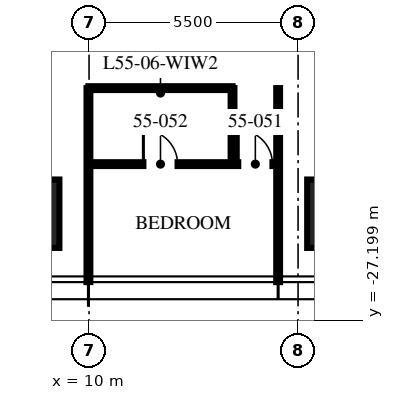
"""IFC4 building model, lengths in metres.
Left out: names, types, materials, properties, quantities, classifications, styles, units other than length and angle.
Written with IfcOpenShell. Run it as: python <this file> out.ifc"""

import sys

from ifc_helpers import new_model, si_unit, direction, frame, frame_2d, origin, origin_2d, place, context, subcontext, project, spatial, rectangle, extrude, element, fill, save


model = new_model("IFC4")
c1 = context("Model", 3, precision=1e-05, world=origin(), true_north=direction((0.0, 1.0)))
c2 = subcontext(c1, "Body", "Model", "MODEL_VIEW")
j1 = project(units=[si_unit("LENGTHUNIT", "METRE"), si_unit("PLANEANGLEUNIT", "RADIAN")], contexts=[c1])
p1 = place(None, origin())
s1 = spatial("IfcSite", under=j1, at=p1, CompositionType="ELEMENT")
p2 = place(p1, origin())
s2 = spatial("IfcBuilding", under=s1, at=p2, CompositionType="ELEMENT")
p3 = place(p2, frame((0.0, 0.0, 222.0)))
s3 = spatial("IfcBuildingStorey", under=s2, at=p3, CompositionType="ELEMENT", Elevation=222.0)
for number, where, z_axis, x_axis in (
    (1, (16.64, -24.4, 0.0), (0.0, 0.0, 1.0), (1.0, 0.0, 0.0)),
    (2, (8.32, -24.4, 0.0), (0.0, 0.0, 1.0), (1.0, 0.0, 0.0)),
):
    element("IfcColumn", number, at=place(p3, frame(where, z_axis=z_axis, x_axis=x_axis)), inside=s3, PredefinedType="COLUMN", context=c2, shape_type="SweptSolid", body=[
        extrude(rectangle(XDim=1.8, YDim=1.8, at=origin_2d()), origin(), (0.0, 0.0, 1.0), 3.75),
    ])
for number, where, z_axis, x_axis in (
    (3, (9.984, -21.095, 0.0), (0.0, 0.0, 1.0), (0.0, -1.0, 0.0)),
    (4, (14.976, -21.095, 0.0), (0.0, 0.0, 1.0), (0.0, -1.0, 0.0)),
):
    element("IfcWall", number, at=place(p3, frame(where, z_axis=z_axis, x_axis=x_axis)), inside=s3, PredefinedType="PARTITIONING", context=c2, shape_type="SweptSolid", body=[
        extrude(rectangle(XDim=5.105, YDim=0.1, at=frame_2d((2.552, 0.0))), origin(), (0.0, 0.0, 1.0), 2.91),
    ])
p4 = place(p3, frame((9.984, -23.095, 0.0), z_axis=(0.0, 0.0, 1.0), x_axis=(1.0, 0.0, 0.0)))
e5 = element("IfcWall", 5, at=p4, inside=s3, PredefinedType="PARTITIONING", context=c2, shape_type="SweptSolid", body=[
    extrude(rectangle(XDim=4.992, YDim=0.1, at=frame_2d((2.496, 0.0))), origin(), (0.0, 0.0, 1.0), 2.81),
])
p5 = place(p4, frame((3.942, 0.0, 0.0)))
e6 = element("IfcOpeningElement", 6, at=p5, cuts=e5, PredefinedType="OPENING", context=c2, shape_type="SweptSolid", body=[
    extrude(rectangle(XDim=0.9, YDim=2.1, at=frame_2d((0.45, 1.05))), frame((0.0, 0.06, 0.0), z_axis=(0.0, -1.0, 0.0), x_axis=(1.0, 0.0, 0.0)), (0.0, 0.0, 1.0), 0.12),
])
p6 = place(p4, frame((1.446, 0.0, 0.0)))
e7 = element("IfcOpeningElement", 7, at=p6, cuts=e5, PredefinedType="OPENING", context=c2, shape_type="SweptSolid", body=[
    extrude(rectangle(XDim=0.9, YDim=2.1, at=frame_2d((0.45, 1.05))), frame((0.0, 0.06, 0.0), z_axis=(0.0, -1.0, 0.0), x_axis=(1.0, 0.0, 0.0)), (0.0, 0.0, 1.0), 0.12),
])
p7 = place(p3, frame((13.776, -21.095, 0.0), z_axis=(0.0, 0.0, 1.0), x_axis=(0.0, -1.0, 0.0)))
e8 = element("IfcWall", 8, at=p7, inside=s3, PredefinedType="PARTITIONING", context=c2, shape_type="SweptSolid", body=[
    extrude(rectangle(XDim=2.0, YDim=0.1, at=frame_2d((1.0, 0.0))), origin(), (0.0, 0.0, 1.0), 3.5),
])
p8 = place(p3, frame((9.984, -21.095, 0.0), z_axis=(0.0, 0.0, 1.0), x_axis=(1.0, 0.0, 0.0)))
e9 = element("IfcWall", 9, at=p8, inside=s3, PredefinedType="PARTITIONING", context=c2, shape_type="SweptSolid", body=[
    extrude(rectangle(XDim=3.792, YDim=0.1, at=frame_2d((1.896, 0.0))), origin(), (0.0, 0.0, 1.0), 2.81),
])
p9 = place(p5, origin())
e10 = element("IfcDoor", 10, at=p9, inside=s3, OperationType="SINGLE_SWING_LEFT", PredefinedType="DOOR", context=c2, shape_type="SweptSolid", body=[
    extrude(rectangle(XDim=0.9, YDim=2.1, at=frame_2d((0.45, 1.05))), frame((0.0, 0.025, 0.0), z_axis=(0.0, -1.0, 0.0), x_axis=(1.0, 0.0, 0.0)), (0.0, 0.0, 1.0), 0.05),
])
fill(e6, e10)
p10 = place(p6, origin())
e11 = element("IfcDoor", 11, at=p10, inside=s3, OperationType="SINGLE_SWING_LEFT", PredefinedType="DOOR", context=c2, shape_type="SweptSolid", body=[
    extrude(rectangle(XDim=0.9, YDim=2.1, at=frame_2d((0.45, 1.05))), frame((0.0, 0.025, 0.0), z_axis=(0.0, -1.0, 0.0), x_axis=(1.0, 0.0, 0.0)), (0.0, 0.0, 1.0), 0.05),
])
fill(e7, e11)
save(model, sys.argv[1])
